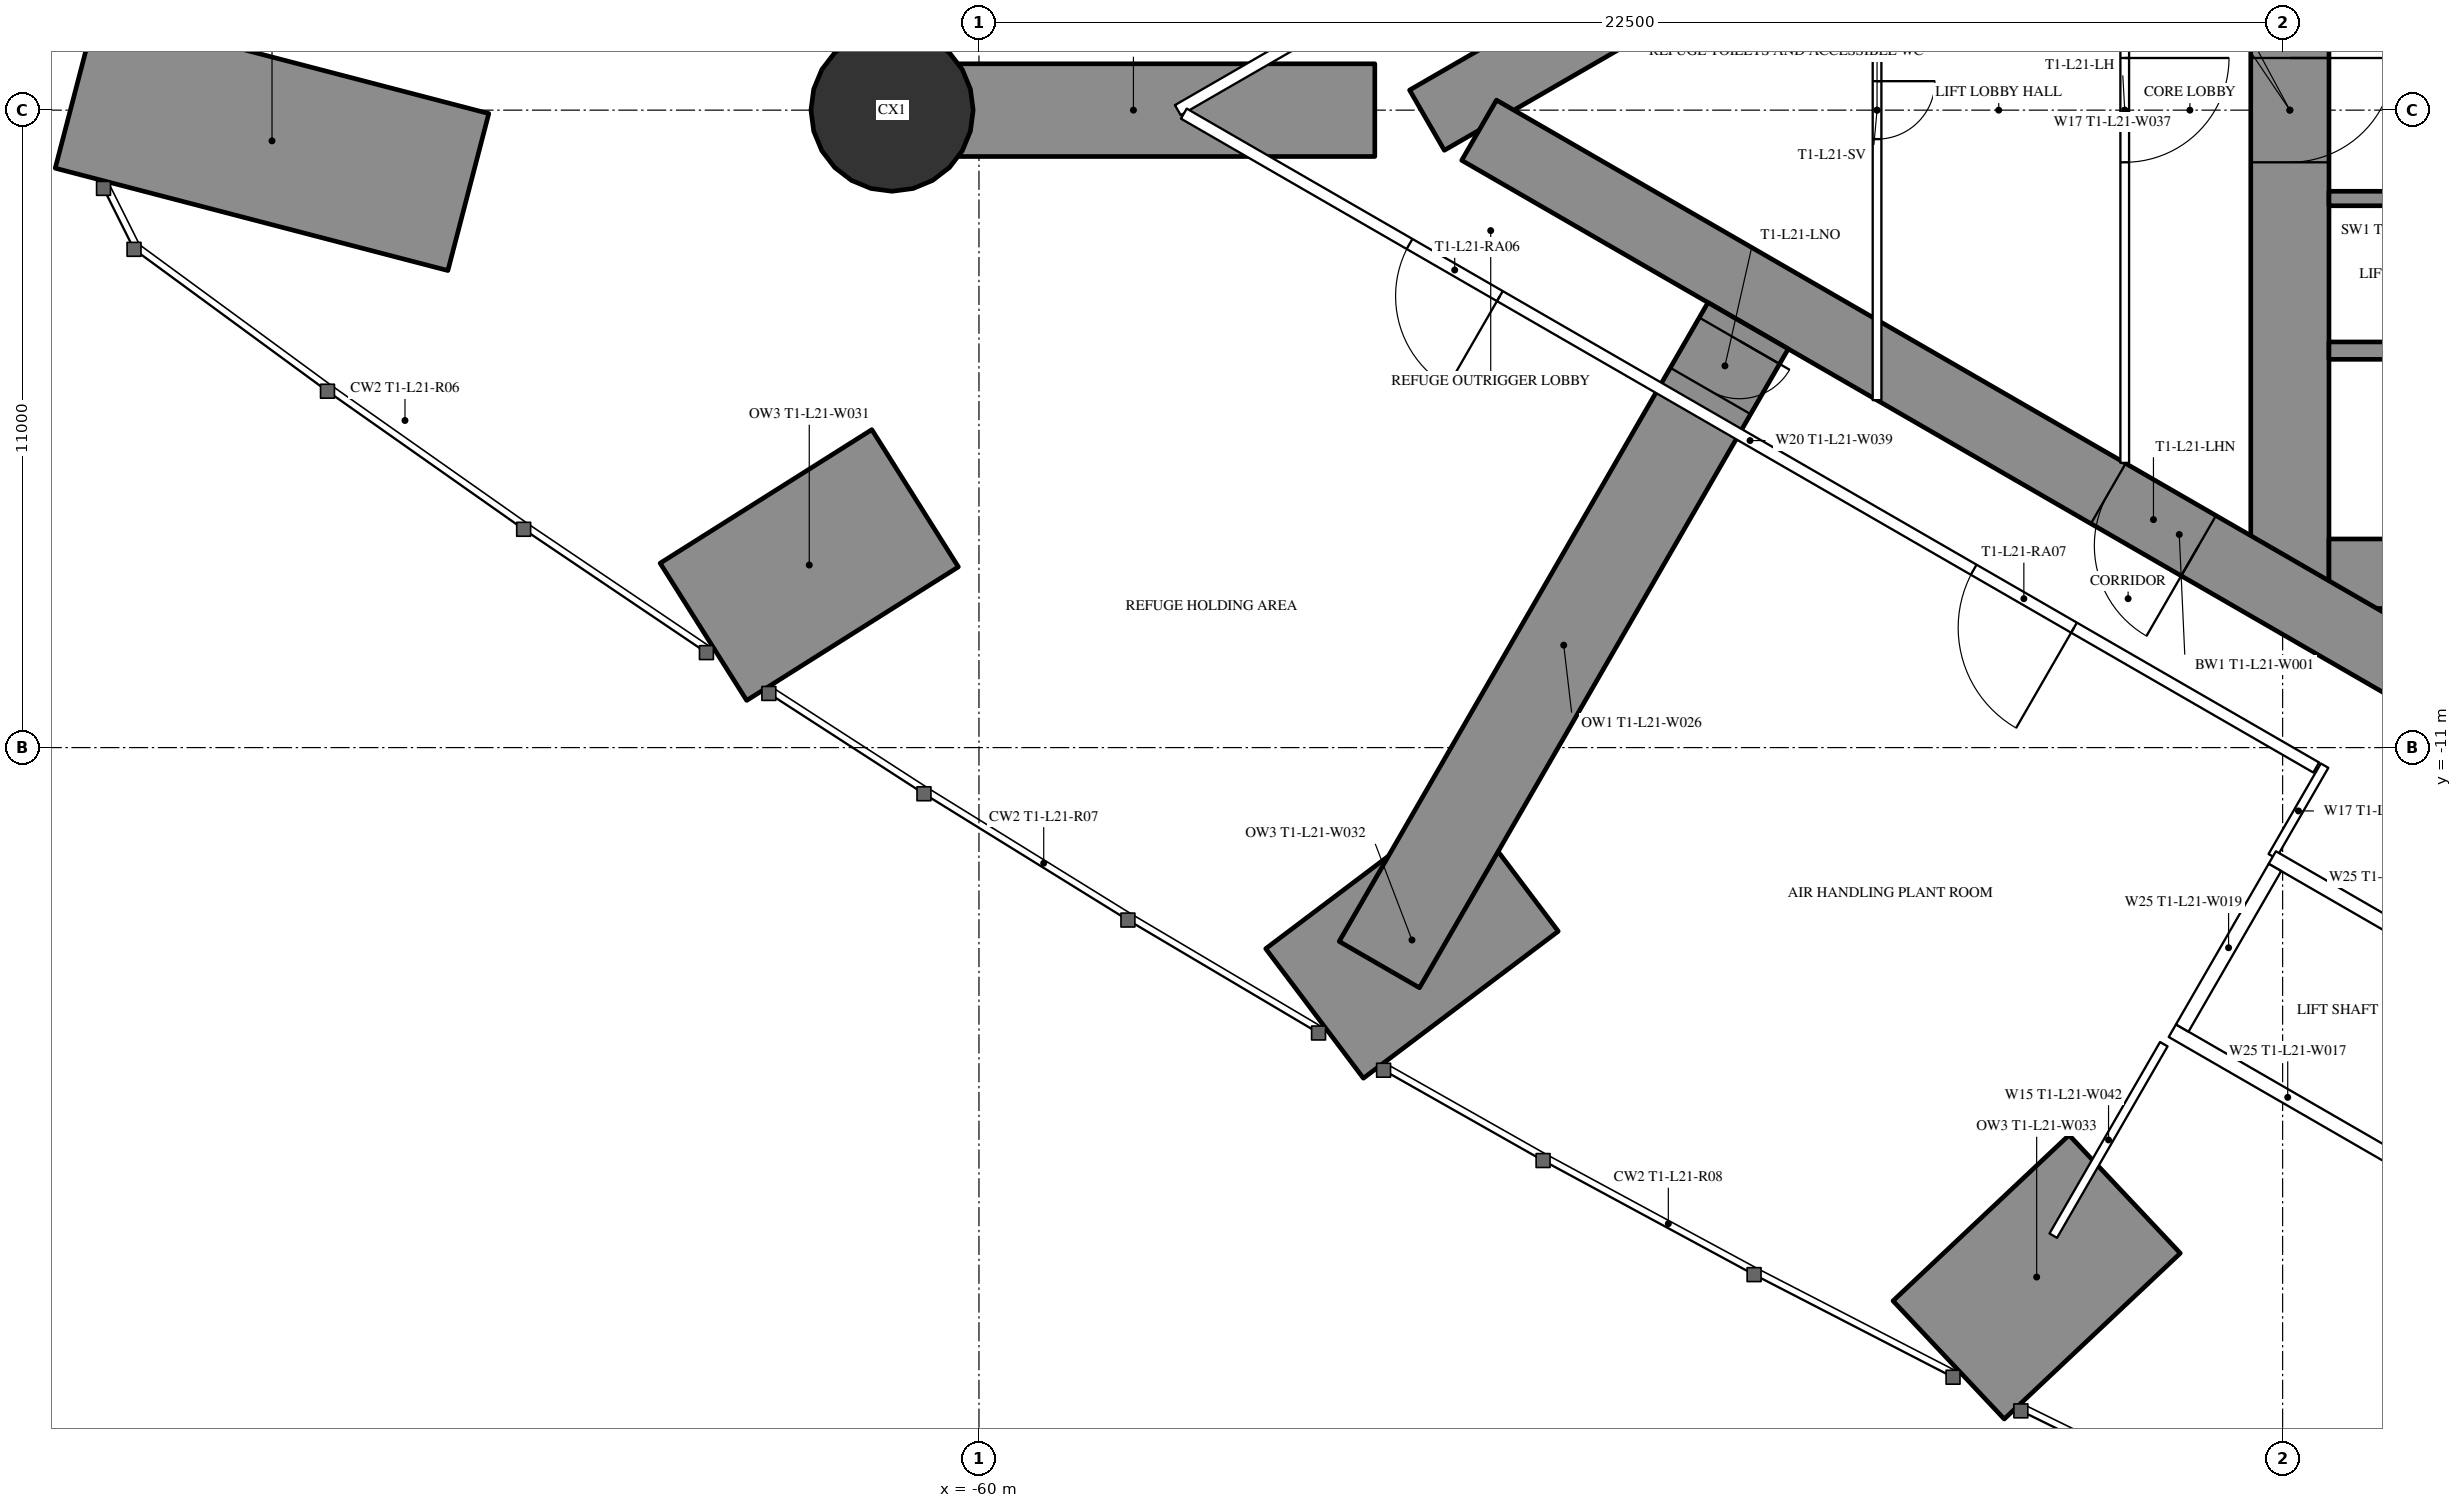
"""IFC4 building model, lengths in metres.
Left out: names, types, materials, properties, quantities, classifications, styles, units other than length and angle.
Written with IfcOpenShell. Run it as: python <this file> out.ifc"""

import sys

from ifc_helpers import new_model, si_unit, direction, frame, frame_2d, origin, origin_2d, place, context, subcontext, project, spatial, rectangle, hollow_circle, extrude, element, fill, save


model = new_model("IFC4")
c1 = context("Model", 3, precision=1e-05, world=origin(), true_north=direction((0.0, 1.0)))
c2 = subcontext(c1, "Body", "Model", "MODEL_VIEW")
j1 = project(units=[si_unit("LENGTHUNIT", "METRE"), si_unit("PLANEANGLEUNIT", "RADIAN")], contexts=[c1])
p1 = place(None, origin())
s1 = spatial("IfcSite", under=j1, at=p1, CompositionType="ELEMENT")
p2 = place(p1, origin())
s2 = spatial("IfcBuilding", under=s1, at=p2, CompositionType="ELEMENT")
p3 = place(p2, frame((0.0, 0.0, 81.0)))
s3 = spatial("IfcBuildingStorey", under=s2, at=p3, CompositionType="ELEMENT", Elevation=81.0)
p4 = place(p3, frame((-75.59, 0.353, 0.0), z_axis=(0.0, 0.0, 1.0), x_axis=(0.967676481034, -0.252194821623, 0.0)))
e1 = element("IfcWall", 1, at=p4, inside=s3, PredefinedType="SHEAR", context=c2, shape_type="SweptSolid", body=[
    extrude(rectangle(XDim=7.003, YDim=2.8, at=frame_2d((3.501, 0.0))), origin(), (0.0, 0.0, 1.0), 6.0),
])
p5 = place(p3, frame((-64.756, -9.002, 0.0), z_axis=(0.0, 0.0, 1.0), x_axis=(0.845851319887, 0.533418732934, 0.0)))
e2 = element("IfcWall", 2, at=p5, inside=s3, PredefinedType="SHEAR", context=c2, shape_type="SweptSolid", body=[
    extrude(rectangle(XDim=4.32, YDim=2.8, at=frame_2d((2.16, 0.0))), origin(), (0.0, 0.0, 1.0), 6.0),
])
p6 = place(p3, frame((-54.208, -15.588, 0.0), z_axis=(0.0, 0.0, 1.0), x_axis=(0.798432065831, 0.602084907843, 0.0)))
e3 = element("IfcWall", 3, at=p6, inside=s3, PredefinedType="SHEAR", context=c2, shape_type="SweptSolid", body=[
    extrude(rectangle(XDim=4.211, YDim=2.8, at=frame_2d((2.106, 0.0))), origin(), (0.0, 0.0, 1.0), 6.0),
])
p7 = place(p3, frame((-43.265, -21.567, 0.0), z_axis=(0.0, 0.0, 1.0), x_axis=(0.728105540353, 0.685465040762, 0.0)))
e4 = element("IfcWall", 4, at=p7, inside=s3, PredefinedType="SHEAR", context=c2, shape_type="SweptSolid", body=[
    extrude(rectangle(XDim=4.174, YDim=2.8, at=frame_2d((2.087, 0.0))), origin(), (0.0, 0.0, 1.0), 6.0),
])
p8 = place(p3, frame((-61.5, 0.0, 0.0), z_axis=(0.0, 0.0, 1.0), x_axis=(1.0, 0.0, 0.0)))
e5 = element("IfcColumn", 5, at=p8, inside=s3, PredefinedType="COLUMN", context=c2, shape_type="SweptSolid", body=[
    extrude(hollow_circle(Radius=1.4, WallThickness=0.1, at=origin_2d()), origin(), (0.0, 0.0, 1.0), 6.0),
])
p9 = place(p3, frame((-37.375, 8.6, 0.0), z_axis=(0.0, 0.0, 1.0), x_axis=(0.0, -1.0, 0.0)))
e6 = element("IfcWall", 6, at=p9, inside=s3, PredefinedType="SHEAR", context=c2, shape_type="SweptSolid", body=[
    extrude(rectangle(XDim=17.2, YDim=1.35, at=frame_2d((8.6, 0.0))), origin(), (0.0, 0.0, 1.0), 6.0),
])
p10 = place(p9, frame((7.7, 0.0, 0.0)))
e7 = element("IfcOpeningElement", 7, at=p10, cuts=e6, PredefinedType="OPENING", context=c2, shape_type="SweptSolid", body=[
    extrude(rectangle(XDim=1.8, YDim=2.2, at=frame_2d((0.9, 1.1))), frame((0.0, 0.685, 0.0), z_axis=(0.0, -1.0, 0.0), x_axis=(1.0, 0.0, 0.0)), (0.0, 0.0, 1.0), 1.37),
])
p11 = place(p3, frame((-28.3, -8.0, 0.0), z_axis=(0.0, 0.0, 1.0), x_axis=(-1.0, 0.0, 0.0)))
e8 = element("IfcWall", 8, at=p11, inside=s3, PredefinedType="SHEAR", context=c2, shape_type="SweptSolid", body=[
    extrude(rectangle(XDim=8.4, YDim=1.2, at=frame_2d((4.2, 0.0))), origin(), (0.0, 0.0, 1.0), 6.0),
])
p12 = place(p11, frame((0.25, 0.0, 0.0)))
e9 = element("IfcOpeningElement", 9, at=p12, cuts=e8, PredefinedType="OPENING", context=c2, shape_type="SweptSolid", body=[
    extrude(rectangle(XDim=1.0, YDim=2.2, at=frame_2d((0.5, 1.1))), frame((0.0, 0.61, 0.0), z_axis=(0.0, -1.0, 0.0), x_axis=(1.0, 0.0, 0.0)), (0.0, 0.0, 1.0), 1.22),
])
p13 = place(p3, frame((-28.3, -4.15, 0.0), z_axis=(0.0, 0.0, 1.0), x_axis=(-1.0, 0.0, 0.0)))
e10 = element("IfcWall", 10, at=p13, inside=s3, PredefinedType="SHEAR", context=c2, shape_type="SweptSolid", body=[
    extrude(rectangle(XDim=8.4, YDim=0.3, at=frame_2d((4.2, 0.0))), origin(), (0.0, 0.0, 1.0), 6.0),
])
p14 = place(p3, frame((-34.25, -1.525, 0.0), z_axis=(0.0, 0.0, 1.0), x_axis=(-1.0, 0.0, 0.0)))
e11 = element("IfcWall", 11, at=p14, inside=s3, PredefinedType="SHEAR", context=c2, shape_type="SweptSolid", body=[
    extrude(rectangle(XDim=2.45, YDim=0.25, at=frame_2d((1.225, 0.0))), origin(), (0.0, 0.0, 1.0), 6.0),
])
p15 = place(p3, frame((-27.2, 14.3, 0.0), z_axis=(0.0, 0.0, 1.0), x_axis=(-0.866026593062, -0.499997940104, 0.0)))
e12 = element("IfcWall", 12, at=p15, inside=s3, PredefinedType="SHEAR", context=c2, shape_type="SweptSolid", body=[
    extrude(rectangle(XDim=28.946, YDim=1.2, at=frame_2d((14.473, 0.0))), origin(), (0.0, 0.0, 1.0), 6.0),
])
p16 = place(p15, frame((4.6, 0.0, 0.0)))
e13 = element("IfcOpeningElement", 13, at=p16, cuts=e12, PredefinedType="OPENING", context=c2, shape_type="SweptSolid", body=[
    extrude(rectangle(XDim=1.0, YDim=2.2, at=frame_2d((0.5, 1.1))), frame((0.0, 0.61, 0.0), z_axis=(0.0, -1.0, 0.0), x_axis=(1.0, 0.0, 0.0)), (0.0, 0.0, 1.0), 1.22),
])
p17 = place(p15, frame((13.568, 0.0, 0.0)))
e14 = element("IfcOpeningElement", 14, at=p17, cuts=e12, PredefinedType="OPENING", context=c2, shape_type="SweptSolid", body=[
    extrude(rectangle(XDim=1.8, YDim=2.2, at=frame_2d((0.9, 1.1))), frame((0.0, 0.61, 0.0), z_axis=(0.0, -1.0, 0.0), x_axis=(1.0, 0.0, 0.0)), (0.0, 0.0, 1.0), 1.22),
])
p18 = place(p3, frame((-27.2, -14.3, 0.0), z_axis=(0.0, 0.0, 1.0), x_axis=(-0.866024021859, 0.500002393557, 0.0)))
e15 = element("IfcWall", 15, at=p18, inside=s3, PredefinedType="SHEAR", context=c2, shape_type="SweptSolid", body=[
    extrude(rectangle(XDim=27.907, YDim=1.2, at=frame_2d((13.954, 0.0))), origin(), (0.0, 0.0, 1.0), 6.0),
])
p19 = place(p18, frame((4.6, 0.0, 0.0)))
e16 = element("IfcOpeningElement", 16, at=p19, cuts=e15, PredefinedType="OPENING", context=c2, shape_type="SweptSolid", body=[
    extrude(rectangle(XDim=1.0, YDim=2.2, at=frame_2d((0.5, 1.1))), frame((0.0, 0.61, 0.0), z_axis=(0.0, -1.0, 0.0), x_axis=(1.0, 0.0, 0.0)), (0.0, 0.0, 1.0), 1.22),
])
p20 = place(p18, frame((13.568, 0.0, 0.0)))
e17 = element("IfcOpeningElement", 17, at=p20, cuts=e15, PredefinedType="OPENING", context=c2, shape_type="SweptSolid", body=[
    extrude(rectangle(XDim=1.8, YDim=2.2, at=frame_2d((0.9, 1.1))), frame((0.0, 0.61, 0.0), z_axis=(0.0, -1.0, 0.0), x_axis=(1.0, 0.0, 0.0)), (0.0, 0.0, 1.0), 1.22),
])
p21 = place(p3, frame((-53.168, 0.0, 0.0), z_axis=(0.0, 0.0, 1.0), x_axis=(-1.0, 0.0, 0.0)))
e18 = element("IfcWall", 18, at=p21, inside=s3, PredefinedType="SHEAR", context=c2, shape_type="SweptSolid", body=[
    extrude(rectangle(XDim=8.332, YDim=1.6, at=frame_2d((4.166, 0.0))), origin(), (0.0, 0.0, 1.0), 6.0),
])
p22 = place(p3, frame((-46.725, -3.72, 0.0), z_axis=(0.0, 0.0, 1.0), x_axis=(-0.500000237956, -0.866025266401, 0.0)))
e19 = element("IfcWall", 19, at=p22, inside=s3, PredefinedType="SHEAR", context=c2, shape_type="SweptSolid", body=[
    extrude(rectangle(XDim=12.73, YDim=1.6, at=frame_2d((6.365, 0.0))), origin(), (0.0, 0.0, 1.0), 6.0),
])
p23 = place(p22, frame((0.3, 0.0, 0.0)))
e20 = element("IfcOpeningElement", 20, at=p23, cuts=e19, PredefinedType="OPENING", context=c2, shape_type="SweptSolid", body=[
    extrude(rectangle(XDim=1.0, YDim=2.2, at=frame_2d((0.5, 1.1))), frame((0.0, 0.81, 0.0), z_axis=(0.0, -1.0, 0.0), x_axis=(1.0, 0.0, 0.0)), (0.0, 0.0, 1.0), 1.62),
])
p24 = place(p3, frame((-39.551, -16.118, 0.0), z_axis=(0.0, 0.0, 1.0), x_axis=(-0.499986503906, -0.866033195618, 0.0)))
e21 = element("IfcWall", 21, at=p24, inside=s3, PredefinedType="PARTITIONING", context=c2, shape_type="SweptSolid", body=[
    extrude(rectangle(XDim=3.815, YDim=0.15, at=frame_2d((1.907, 0.0))), origin(), (0.0, 0.0, 1.0), 5.75),
])
p25 = place(p3, frame((-37.7, 10.894, 0.0), z_axis=(0.0, 0.0, 1.0), x_axis=(-0.866027905338, -0.499995667157, 0.0)))
e22 = element("IfcWall", 22, at=p25, inside=s3, PredefinedType="PARTITIONING", context=c2, shape_type="SweptSolid", body=[
    extrude(rectangle(XDim=21.787, YDim=0.2, at=frame_2d((10.894, 0.0))), origin(), (0.0, 0.0, 1.0), 5.75),
])
p26 = place(p25, frame((15.369, 0.0, 0.0)))
e23 = element("IfcOpeningElement", 23, at=p26, cuts=e22, PredefinedType="OPENING", context=c2, shape_type="SweptSolid", body=[
    extrude(rectangle(XDim=1.8, YDim=2.2, at=frame_2d((0.9, 1.1))), frame((0.0, 0.11, 0.0), z_axis=(0.0, -1.0, 0.0), x_axis=(1.0, 0.0, 0.0)), (0.0, 0.0, 1.0), 0.22),
])
p27 = place(p25, frame((4.476, 0.0, 0.0)))
e24 = element("IfcOpeningElement", 24, at=p27, cuts=e22, PredefinedType="OPENING", context=c2, shape_type="SweptSolid", body=[
    extrude(rectangle(XDim=1.8, YDim=2.2, at=frame_2d((0.9, 1.1))), frame((0.0, 0.11, 0.0), z_axis=(0.0, -1.0, 0.0), x_axis=(1.0, 0.0, 0.0)), (0.0, 0.0, 1.0), 0.22),
])
p28 = place(p3, frame((-36.92, -11.344, 0.0), z_axis=(0.0, 0.0, 1.0), x_axis=(-0.866028313256, 0.499994960614, 0.0)))
e25 = element("IfcWall", 25, at=p28, inside=s3, PredefinedType="PARTITIONING", context=c2, shape_type="SweptSolid", body=[
    extrude(rectangle(XDim=22.568, YDim=0.2, at=frame_2d((11.284, 0.0))), origin(), (0.0, 0.0, 1.0), 5.75),
])
p29 = place(p28, frame((16.27, 0.0, 0.0)))
e26 = element("IfcOpeningElement", 26, at=p29, cuts=e25, PredefinedType="OPENING", context=c2, shape_type="SweptSolid", body=[
    extrude(rectangle(XDim=1.8, YDim=2.2, at=frame_2d((0.9, 1.1))), frame((0.0, 0.11, 0.0), z_axis=(0.0, -1.0, 0.0), x_axis=(1.0, 0.0, 0.0)), (0.0, 0.0, 1.0), 0.22),
])
p30 = place(p28, frame((4.826, 0.0, 0.0)))
e27 = element("IfcOpeningElement", 27, at=p30, cuts=e25, PredefinedType="OPENING", context=c2, shape_type="SweptSolid", body=[
    extrude(rectangle(XDim=2.0, YDim=2.4, at=frame_2d((1.0, 1.2))), frame((0.0, 0.11, 0.0), z_axis=(0.0, -1.0, 0.0), x_axis=(1.0, 0.0, 0.0)), (0.0, 0.0, 1.0), 0.22),
])
p31 = place(p3, frame((-36.776, -11.312, 0.0), z_axis=(0.0, 0.0, 1.0), x_axis=(-0.500038651731, -0.866003087047, 0.0)))
e28 = element("IfcWall", 28, at=p31, inside=s3, PredefinedType="PARTITIONING", context=c2, shape_type="SweptSolid", body=[
    extrude(rectangle(XDim=1.804, YDim=0.15, at=frame_2d((0.902, 0.0))), origin(), (0.0, 0.0, 1.0), 5.75),
])
p32 = place(p3, frame((-40.225, 6.087, 0.0), z_axis=(0.0, 0.0, 1.0), x_axis=(0.0, -1.0, 0.0)))
e29 = element("IfcWall", 29, at=p32, inside=s3, PredefinedType="PARTITIONING", context=c2, shape_type="SweptSolid", body=[
    extrude(rectangle(XDim=12.174, YDim=0.15, at=frame_2d((6.087, 0.0))), origin(), (0.0, 0.0, 1.0), 5.75),
])
p33 = place(p32, frame((5.187, 0.0, 0.0)))
e30 = element("IfcOpeningElement", 30, at=p33, cuts=e29, PredefinedType="OPENING", context=c2, shape_type="SweptSolid", body=[
    extrude(rectangle(XDim=1.8, YDim=2.2, at=frame_2d((0.9, 1.1))), frame((0.0, 0.085, 0.0), z_axis=(0.0, -1.0, 0.0), x_axis=(1.0, 0.0, 0.0)), (0.0, 0.0, 1.0), 0.17),
])
p34 = place(p3, frame((-44.5, 5.005, 0.0), z_axis=(0.0, 0.0, 1.0), x_axis=(0.0, -1.0, 0.0)))
e31 = element("IfcWall", 31, at=p34, inside=s3, PredefinedType="PARTITIONING", context=c2, shape_type="SweptSolid", body=[
    extrude(rectangle(XDim=10.009, YDim=0.15, at=frame_2d((5.005, 0.0))), origin(), (0.0, 0.0, 1.0), 4.45),
])
p35 = place(p34, frame((4.505, 0.0, 0.0)))
e32 = element("IfcOpeningElement", 32, at=p35, cuts=e31, PredefinedType="OPENING", context=c2, shape_type="SweptSolid", body=[
    extrude(rectangle(XDim=1.0, YDim=2.2, at=frame_2d((0.5, 1.1))), frame((0.0, 0.085, 0.0), z_axis=(0.0, -1.0, 0.0), x_axis=(1.0, 0.0, 0.0)), (0.0, 0.0, 1.0), 0.17),
])
p36 = place(p3, frame((-33.696, -15.197, 0.0), z_axis=(0.0, 0.0, 1.0), x_axis=(-0.865976953817, 0.500083908417, 0.0)))
e33 = element("IfcWall", 33, at=p36, inside=s3, PredefinedType="PARTITIONING", context=c2, shape_type="SweptSolid", body=[
    extrude(rectangle(XDim=4.599, YDim=0.25, at=frame_2d((2.3, 0.0))), origin(), (0.0, 0.0, 1.0), 5.75),
])
p37 = place(p3, frame((-35.42, -18.186, 0.0), z_axis=(0.0, 0.0, 1.0), x_axis=(-0.865990227814, 0.50006092162, 0.0)))
e34 = element("IfcWall", 34, at=p37, inside=s3, PredefinedType="PARTITIONING", context=c2, shape_type="SweptSolid", body=[
    extrude(rectangle(XDim=4.6, YDim=0.25, at=frame_2d((2.3, 0.0))), origin(), (0.0, 0.0, 1.0), 5.75),
])
p38 = place(p3, frame((-37.633, -13.068, 0.0), z_axis=(0.0, 0.0, 1.0), x_axis=(-0.499872130319, -0.866099216793, 0.0)))
e35 = element("IfcWall", 35, at=p38, inside=s3, PredefinedType="PARTITIONING", context=c2, shape_type="SweptSolid", body=[
    extrude(rectangle(XDim=3.2, YDim=0.25, at=frame_2d((1.6, 0.0))), origin(), (0.0, 0.0, 1.0), 5.75),
])
p39 = place(p23, origin())
e36 = element("IfcDoor", 36, at=p39, inside=s3, OperationType="SINGLE_SWING_LEFT", PredefinedType="DOOR", context=c2, shape_type="SweptSolid", body=[
    extrude(rectangle(XDim=1.0, YDim=2.2, at=frame_2d((0.5, 1.1))), frame((0.0, 0.025, 0.0), z_axis=(0.0, -1.0, 0.0), x_axis=(1.0, 0.0, 0.0)), (0.0, 0.0, 1.0), 0.05),
])
fill(e20, e36)
p40 = place(p29, origin())
e37 = element("IfcDoor", 37, at=p40, inside=s3, OperationType="DOUBLE_DOOR_SINGLE_SWING", PredefinedType="DOOR", context=c2, shape_type="SweptSolid", body=[
    extrude(rectangle(XDim=1.8, YDim=2.2, at=frame_2d((0.9, 1.1))), frame((0.0, 0.025, 0.0), z_axis=(0.0, -1.0, 0.0), x_axis=(1.0, 0.0, 0.0)), (0.0, 0.0, 1.0), 0.05),
])
fill(e26, e37)
p41 = place(p30, origin())
e38 = element("IfcDoor", 38, at=p41, inside=s3, OperationType="DOUBLE_DOOR_SINGLE_SWING", PredefinedType="DOOR", context=c2, shape_type="SweptSolid", body=[
    extrude(rectangle(XDim=2.0, YDim=2.4, at=frame_2d((1.0, 1.2))), frame((0.0, 0.025, 0.0), z_axis=(0.0, -1.0, 0.0), x_axis=(1.0, 0.0, 0.0)), (0.0, 0.0, 1.0), 0.05),
])
fill(e27, e38)
p42 = place(p33, origin())
e39 = element("IfcDoor", 39, at=p42, inside=s3, OperationType="DOUBLE_DOOR_SINGLE_SWING", PredefinedType="DOOR", context=c2, shape_type="SweptSolid", body=[
    extrude(rectangle(XDim=1.8, YDim=2.2, at=frame_2d((0.9, 1.1))), frame((0.0, 0.025, 0.0), z_axis=(0.0, -1.0, 0.0), x_axis=(1.0, 0.0, 0.0)), (0.0, 0.0, 1.0), 0.05),
])
fill(e30, e39)
p43 = place(p35, origin())
e40 = element("IfcDoor", 40, at=p43, inside=s3, OperationType="SINGLE_SWING_LEFT", PredefinedType="DOOR", context=c2, shape_type="SweptSolid", body=[
    extrude(rectangle(XDim=1.0, YDim=2.2, at=frame_2d((0.5, 1.1))), frame((0.0, 0.025, 0.0), z_axis=(0.0, -1.0, 0.0), x_axis=(1.0, 0.0, 0.0)), (0.0, 0.0, 1.0), 0.05),
])
fill(e32, e40)
p44 = place(p20, origin())
e41 = element("IfcDoor", 41, at=p44, inside=s3, OperationType="DOUBLE_DOOR_SINGLE_SWING", PredefinedType="DOOR", context=c2, shape_type="SweptSolid", body=[
    extrude(rectangle(XDim=1.8, YDim=2.2, at=frame_2d((0.9, 1.1))), frame((0.0, 0.025, 0.0), z_axis=(0.0, -1.0, 0.0), x_axis=(1.0, 0.0, 0.0)), (0.0, 0.0, 1.0), 0.05),
])
fill(e17, e41)
p45 = place(p10, origin())
e42 = element("IfcDoor", 42, at=p45, inside=s3, OperationType="DOUBLE_DOOR_SINGLE_SWING", PredefinedType="DOOR", context=c2, shape_type="SweptSolid", body=[
    extrude(rectangle(XDim=1.8, YDim=2.2, at=frame_2d((0.9, 1.1))), frame((0.0, 0.025, 0.0), z_axis=(0.0, -1.0, 0.0), x_axis=(1.0, 0.0, 0.0)), (0.0, 0.0, 1.0), 0.05),
])
fill(e7, e42)
save(model, sys.argv[1])
